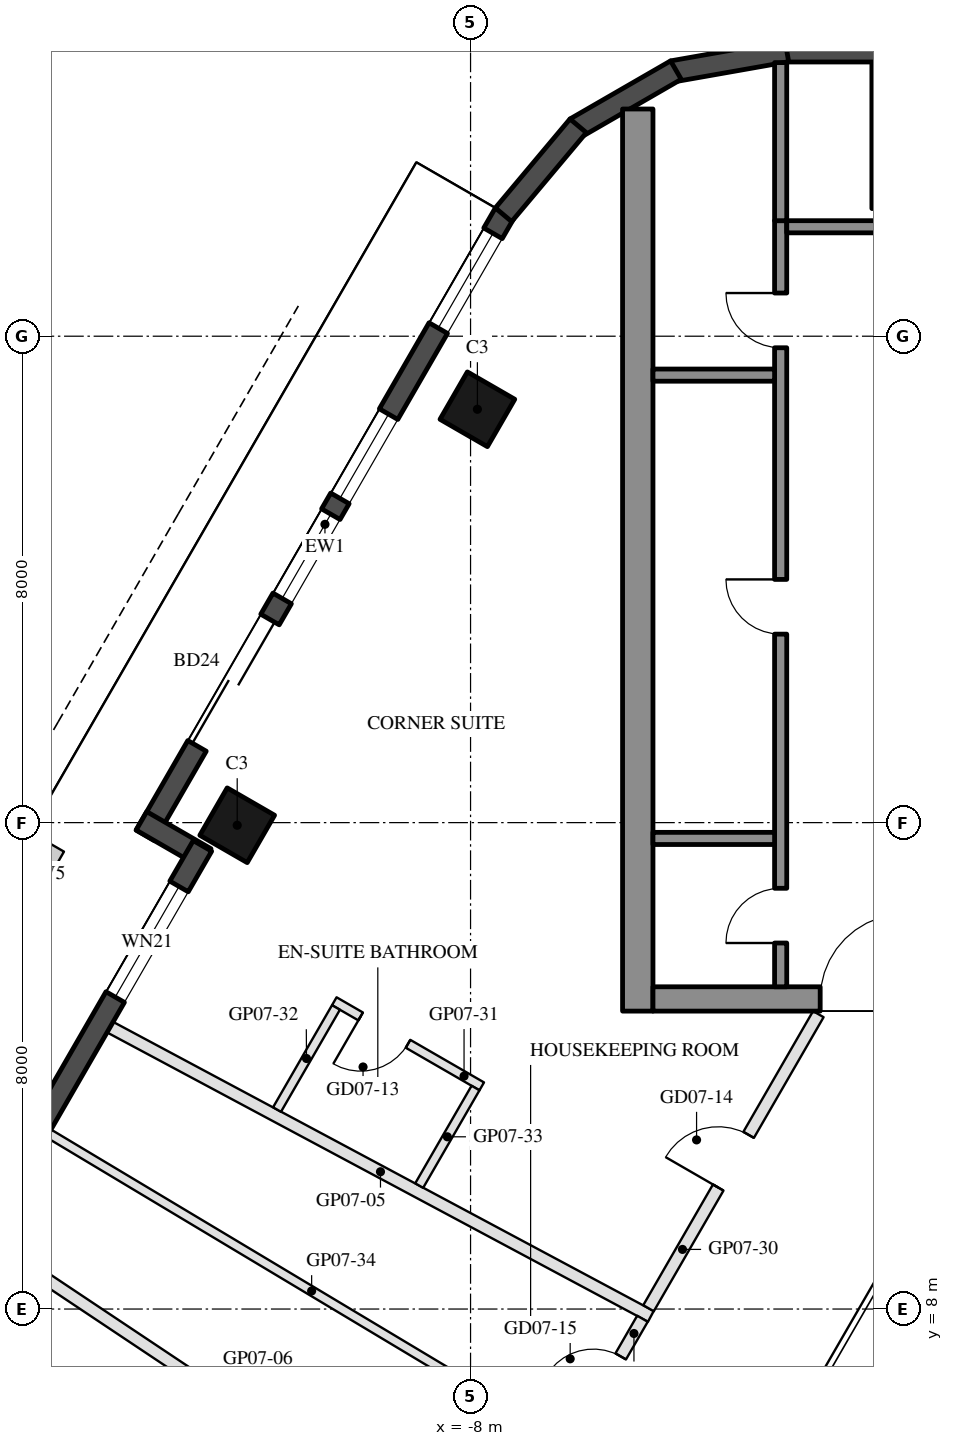
"""IFC4 building model, lengths in metres.
Left out: names, types, materials, properties, quantities, classifications, styles, units other than length and angle.
Written with IfcOpenShell. Run it as: python <this file> out.ifc"""

import sys

from ifc_helpers import new_model, si_unit, direction, frame, frame_2d, origin, origin_2d, place, context, subcontext, project, spatial, rectangle, hollow_rectangle, extrude, element, fill, save


model = new_model("IFC4")
c1 = context("Model", 3, precision=1e-05, world=origin(), true_north=direction((0.0, 1.0)))
c2 = subcontext(c1, "Body", "Model", "MODEL_VIEW")
j1 = project(units=[si_unit("LENGTHUNIT", "METRE"), si_unit("PLANEANGLEUNIT", "RADIAN")], contexts=[c1])
p1 = place(None, origin())
s1 = spatial("IfcSite", under=j1, at=p1, CompositionType="ELEMENT")
p2 = place(p1, origin())
s2 = spatial("IfcBuilding", under=s1, at=p2, CompositionType="ELEMENT")
p3 = place(p2, frame((0.0, 0.0, 98.3)))
s3 = spatial("IfcBuildingStorey", under=s2, at=p3, CompositionType="ELEMENT", Elevation=98.3)
for number, where, z_axis, x_axis in (
    (1, (-7.888, 22.798, 0.0), (0.0, 0.0, 1.0), (0.5, 0.866, 0.0)),
    (2, (-11.838, 15.957, 0.0), (0.0, 0.0, 1.0), (0.5, 0.866, 0.0)),
):
    element("IfcColumn", number, at=place(p3, frame(where, z_axis=z_axis, x_axis=x_axis)), inside=s3, PredefinedType="COLUMN", context=c2, shape_type="SweptSolid", body=[
        extrude(hollow_rectangle(XDim=0.9, YDim=0.9, WallThickness=0.04, at=origin_2d()), origin(), (0.0, 0.0, 1.0), 3.7),
    ])
p4 = place(p3, frame((0.0, 27.3, 0.0), z_axis=(0.0, 0.0, 1.0), x_axis=(1.0, 0.0, 0.0)))
e3 = element("IfcColumn", 3, at=p4, inside=s3, PredefinedType="COLUMN", context=c2, shape_type="SweptSolid", body=[
    extrude(hollow_rectangle(XDim=2.8, YDim=2.4, WallThickness=0.07, at=origin_2d()), origin(), (0.0, 0.0, 1.0), 3.7),
])
p5 = place(p3, frame((-7.441, 26.022, 0.0), z_axis=(0.0, 0.0, 1.0), x_axis=(-0.499992533062, -0.86602971478, 0.0)))
e4 = element("IfcWall", 4, at=p5, inside=s3, PredefinedType="SOLIDWALL", context=c2, shape_type="SweptSolid", body=[
    extrude(rectangle(XDim=11.816, YDim=0.35, at=frame_2d((5.908, 0.0))), origin(), (0.0, 0.0, 1.0), 3.55),
])
p6 = place(p5, frame((0.381, 0.0, 0.3)))
e5 = element("IfcOpeningElement", 5, at=p6, cuts=e4, PredefinedType="OPENING", context=c2, shape_type="SweptSolid", body=[
    extrude(rectangle(XDim=1.8, YDim=2.65, at=frame_2d((0.9, 1.325))), frame((0.0, 0.185, 0.0), z_axis=(0.0, -1.0, 0.0), x_axis=(1.0, 0.0, 0.0)), (0.0, 0.0, 1.0), 0.37),
])
p7 = place(p5, frame((7.716, 0.0, 0.0)))
e6 = element("IfcOpeningElement", 6, at=p7, cuts=e4, PredefinedType="OPENING", context=c2, shape_type="SweptSolid", body=[
    extrude(rectangle(XDim=2.4, YDim=2.4, at=frame_2d((1.2, 1.2))), frame((0.0, 0.185, 0.0), z_axis=(0.0, -1.0, 0.0), x_axis=(1.0, 0.0, 0.0)), (0.0, 0.0, 1.0), 0.37),
])
p8 = place(p5, frame((3.815, 0.0, 0.3)))
e7 = element("IfcOpeningElement", 7, at=p8, cuts=e4, PredefinedType="OPENING", context=c2, shape_type="SweptSolid", body=[
    extrude(rectangle(XDim=1.6, YDim=2.65, at=frame_2d((0.8, 1.325))), frame((0.0, 0.185, 0.0), z_axis=(0.0, -1.0, 0.0), x_axis=(1.0, 0.0, 0.0)), (0.0, 0.0, 1.0), 0.37),
])
p9 = place(p5, frame((5.715, 0.0, 0.3)))
e8 = element("IfcOpeningElement", 8, at=p9, cuts=e4, PredefinedType="OPENING", context=c2, shape_type="SweptSolid", body=[
    extrude(rectangle(XDim=1.6, YDim=2.65, at=frame_2d((0.8, 1.325))), frame((0.0, 0.185, 0.0), z_axis=(0.0, -1.0, 0.0), x_axis=(1.0, 0.0, 0.0)), (0.0, 0.0, 1.0), 0.37),
])
p10 = place(p3, frame((-13.413, 16.029, 0.0), z_axis=(0.0, 0.0, 1.0), x_axis=(0.866005645448, -0.500034220881, 0.0)))
e9 = element("IfcWall", 9, at=p10, inside=s3, PredefinedType="SOLIDWALL", context=c2, shape_type="SweptSolid", body=[
    extrude(rectangle(XDim=1.22, YDim=0.35, at=frame_2d((0.61, 0.0))), origin(), (0.0, 0.0, 1.0), 3.55),
])
p11 = place(p3, frame((-12.409, 15.617, 0.0), z_axis=(0.0, 0.0, 1.0), x_axis=(-0.500003597184, -0.866023326939, 0.0)))
e10 = element("IfcWall", 10, at=p11, inside=s3, PredefinedType="SOLIDWALL", context=c2, shape_type="SweptSolid", body=[
    extrude(rectangle(XDim=6.74, YDim=0.35, at=frame_2d((3.37, 0.0))), origin(), (0.0, 0.0, 1.0), 3.55),
])
p12 = place(p11, frame((0.77, 0.0, 0.3)))
e11 = element("IfcOpeningElement", 11, at=p12, cuts=e10, PredefinedType="OPENING", context=c2, shape_type="SweptSolid", body=[
    extrude(rectangle(XDim=2.1, YDim=2.65, at=frame_2d((1.05, 1.325))), frame((0.0, 0.185, 0.0), z_axis=(0.0, -1.0, 0.0), x_axis=(1.0, 0.0, 0.0)), (0.0, 0.0, 1.0), 0.37),
])
p13 = place(p3, frame((2.829, 28.685, 0.0), z_axis=(0.0, 0.0, 1.0), x_axis=(-1.0, 0.0, 0.0)))
e12 = element("IfcWall", 12, at=p13, inside=s3, PredefinedType="SOLIDWALL", context=c2, shape_type="SweptSolid", body=[
    extrude(rectangle(XDim=5.658, YDim=0.35, at=frame_2d((2.829, 0.0))), origin(), (0.0, 0.0, 1.0), 3.55),
])
for number, where, z_axis, x_axis in (
    (13, (-2.799, 28.688, 0.0), (0.0, 0.0, 1.0), (-0.985, -0.174, 0.0)),
    (14, (-4.623, 28.377, 0.0), (0.0, 0.0, 1.0), (-0.866, -0.5, 0.0)),
):
    element("IfcWall", number, at=place(p3, frame(where, z_axis=z_axis, x_axis=x_axis)), inside=s3, PredefinedType="SOLIDWALL", context=c2, shape_type="SweptSolid", body=[
        extrude(rectangle(XDim=1.91, YDim=0.35, at=frame_2d((0.955, 0.0))), origin(), (0.0, 0.0, 1.0), 3.55),
    ])
p14 = place(p3, frame((-6.23, 27.461, 0.0), z_axis=(0.0, 0.0, 1.0), x_axis=(-0.642808304945, -0.766027077259, 0.0)))
e15 = element("IfcWall", 15, at=p14, inside=s3, PredefinedType="SOLIDWALL", context=c2, shape_type="SweptSolid", body=[
    extrude(rectangle(XDim=1.91, YDim=0.35, at=frame_2d((0.955, 0.0))), origin(), (0.0, 0.0, 1.0), 3.55),
])
p15 = place(p3, frame((-5.25, 12.9, 0.0), z_axis=(0.0, 0.0, 1.0), x_axis=(0.0, 1.0, 0.0)))
e16 = element("IfcWall", 16, at=p15, inside=s3, PredefinedType="SHEAR", context=c2, shape_type="SweptSolid", body=[
    extrude(rectangle(XDim=14.837, YDim=0.5, at=frame_2d((7.418, 0.0))), origin(), (0.0, 0.0, 1.0), 3.5),
])
p16 = place(p3, frame((5.0, 13.1, 0.0), z_axis=(0.0, 0.0, 1.0), x_axis=(-1.0, 0.0, 0.0)))
e17 = element("IfcWall", 17, at=p16, inside=s3, PredefinedType="SHEAR", context=c2, shape_type="SweptSolid", body=[
    extrude(rectangle(XDim=10.0, YDim=0.4, at=frame_2d((5.0, 0.0))), origin(), (0.0, 0.0, 1.0), 3.5),
])
p17 = place(p16, frame((3.55, 0.0, 0.0)))
e18 = element("IfcOpeningElement", 18, at=p17, cuts=e17, PredefinedType="OPENING", context=c2, shape_type="SweptSolid", body=[
    extrude(rectangle(XDim=1.1, YDim=2.1, at=frame_2d((0.55, 1.05))), frame((0.0, 0.21, 0.0), z_axis=(0.0, -1.0, 0.0), x_axis=(1.0, 0.0, 0.0)), (0.0, 0.0, 1.0), 0.42),
])
p18 = place(p16, frame((5.85, 0.0, 0.0)))
e19 = element("IfcOpeningElement", 19, at=p18, cuts=e17, PredefinedType="OPENING", context=c2, shape_type="SweptSolid", body=[
    extrude(rectangle(XDim=1.4, YDim=2.1, at=frame_2d((0.7, 1.05))), frame((0.0, 0.21, 0.0), z_axis=(0.0, -1.0, 0.0), x_axis=(1.0, 0.0, 0.0)), (0.0, 0.0, 1.0), 0.42),
])
p19 = place(p3, frame((-2.9, 13.3, 0.0), z_axis=(0.0, 0.0, 1.0), x_axis=(0.0, 1.0, 0.0)))
e20 = element("IfcWall", 20, at=p19, inside=s3, PredefinedType="SHEAR", context=c2, shape_type="SweptSolid", body=[
    extrude(rectangle(XDim=12.6, YDim=0.2, at=frame_2d((6.3, 0.0))), origin(), (0.0, 0.0, 1.0), 3.5),
])
p20 = place(p19, frame((0.72, 0.0, 0.0)))
e21 = element("IfcOpeningElement", 21, at=p20, cuts=e20, PredefinedType="OPENING", context=c2, shape_type="SweptSolid", body=[
    extrude(rectangle(XDim=0.9, YDim=2.1, at=frame_2d((0.45, 1.05))), frame((0.0, 0.11, 0.0), z_axis=(0.0, -1.0, 0.0), x_axis=(1.0, 0.0, 0.0)), (0.0, 0.0, 1.0), 0.22),
])
p21 = place(p19, frame((5.8, 0.0, 0.0)))
e22 = element("IfcOpeningElement", 22, at=p21, cuts=e20, PredefinedType="OPENING", context=c2, shape_type="SweptSolid", body=[
    extrude(rectangle(XDim=0.9, YDim=2.1, at=frame_2d((0.45, 1.05))), frame((0.0, 0.11, 0.0), z_axis=(0.0, -1.0, 0.0), x_axis=(1.0, 0.0, 0.0)), (0.0, 0.0, 1.0), 0.22),
])
p22 = place(p19, frame((10.51, 0.0, 0.0)))
e23 = element("IfcOpeningElement", 23, at=p22, cuts=e20, PredefinedType="OPENING", context=c2, shape_type="SweptSolid", body=[
    extrude(rectangle(XDim=0.9, YDim=2.1, at=frame_2d((0.45, 1.05))), frame((0.0, 0.11, 0.0), z_axis=(0.0, -1.0, 0.0), x_axis=(1.0, 0.0, 0.0)), (0.0, 0.0, 1.0), 0.22),
])
p23 = place(p3, frame((-0.4, 25.8, 0.0), z_axis=(0.0, 0.0, 1.0), x_axis=(-1.0, 0.0, 0.0)))
e24 = element("IfcWall", 24, at=p23, inside=s3, PredefinedType="SHEAR", context=c2, shape_type="SweptSolid", body=[
    extrude(rectangle(XDim=2.4, YDim=0.2, at=frame_2d((1.2, 0.0))), origin(), (0.0, 0.0, 1.0), 3.5),
])
for number, where, z_axis, x_axis in (
    (25, (-3.0, 15.74, 0.0), (0.0, 0.0, 1.0), (-1.0, 0.0, 0.0)),
    (26, (-3.0, 23.36, 0.0), (0.0, 0.0, 1.0), (-1.0, 0.0, 0.0)),
):
    element("IfcWall", number, at=place(p3, frame(where, z_axis=z_axis, x_axis=x_axis)), inside=s3, PredefinedType="SHEAR", context=c2, shape_type="SweptSolid", body=[
        extrude(rectangle(XDim=2.0, YDim=0.2, at=frame_2d((1.0, 0.0))), origin(), (0.0, 0.0, 1.0), 3.5),
    ])
p24 = place(p3, frame((-2.9, 25.9, 0.0), z_axis=(0.0, 0.0, 1.0), x_axis=(0.0, 1.0, 0.0)))
e27 = element("IfcWall", 27, at=p24, inside=s3, PredefinedType="SHEAR", context=c2, shape_type="SweptSolid", body=[
    extrude(rectangle(XDim=2.6, YDim=0.2, at=frame_2d((1.3, 0.0))), origin(), (0.0, 0.0, 1.0), 3.5),
])
p25 = place(p3, frame((-13.928, 12.636, 0.0), z_axis=(0.0, 0.0, 1.0), x_axis=(0.881791431821, -0.471639555981, 0.0)))
e28 = element("IfcWall", 28, at=p25, inside=s3, PredefinedType="PARTITIONING", context=c2, shape_type="SweptSolid", body=[
    extrude(rectangle(XDim=10.085, YDim=0.2, at=frame_2d((5.042, 0.0))), origin(), (0.0, 0.0, 1.0), 2.95),
])
p26 = place(p3, frame((-15.447, 8.806, 0.0), z_axis=(0.0, 0.0, 1.0), x_axis=(0.831801127359, -0.55507376494, 0.0)))
e29 = element("IfcWall", 29, at=p26, inside=s3, PredefinedType="PARTITIONING", context=c2, shape_type="SweptSolid", body=[
    extrude(rectangle(XDim=9.5, YDim=0.2, at=frame_2d((4.75, 0.0))), origin(), (0.0, 0.0, 1.0), 2.95),
])
p27 = place(p3, frame((-5.073, 8.013, 0.0), z_axis=(0.0, 0.0, 1.0), x_axis=(0.500003731568, 0.866023249352, 0.0)))
e30 = element("IfcWall", 30, at=p27, inside=s3, PredefinedType="PARTITIONING", context=c2, shape_type="SweptSolid", body=[
    extrude(rectangle(XDim=5.585, YDim=0.2, at=frame_2d((2.792, 0.0))), origin(), (0.0, 0.0, 1.0), 2.95),
])
p28 = place(p27, frame((2.292, 0.0, 0.0)))
e31 = element("IfcOpeningElement", 31, at=p28, cuts=e30, PredefinedType="OPENING", context=c2, shape_type="SweptSolid", body=[
    extrude(rectangle(XDim=1.0, YDim=2.1, at=frame_2d((0.5, 1.05))), frame((0.0, 0.11, 0.0), z_axis=(0.0, -1.0, 0.0), x_axis=(1.0, 0.0, 0.0)), (0.0, 0.0, 1.0), 0.22),
])
p29 = place(p3, frame((-7.816, 11.662, 0.0), z_axis=(0.0, 0.0, 1.0), x_axis=(-0.865996816683, 0.500049511043, 0.0)))
e32 = element("IfcWall", 32, at=p29, inside=s3, PredefinedType="PARTITIONING", context=c2, shape_type="SweptSolid", body=[
    extrude(rectangle(XDim=2.8, YDim=0.15, at=frame_2d((1.4, 0.0))), origin(), (0.0, 0.0, 1.0), 3.55),
])
p30 = place(p29, frame((1.4, 0.0, 0.0)))
e33 = element("IfcOpeningElement", 33, at=p30, cuts=e32, PredefinedType="OPENING", context=c2, shape_type="SweptSolid", body=[
    extrude(rectangle(XDim=0.9, YDim=2.1, at=frame_2d((0.45, 1.05))), frame((0.0, 0.085, 0.0), z_axis=(0.0, -1.0, 0.0), x_axis=(1.0, 0.0, 0.0)), (0.0, 0.0, 1.0), 0.17),
])
p31 = place(p3, frame((-10.213, 12.96, 0.0), z_axis=(0.0, 0.0, 1.0), x_axis=(-0.500013181875, -0.866017793092, 0.0)))
e34 = element("IfcWall", 34, at=p31, inside=s3, PredefinedType="PARTITIONING", context=c2, shape_type="SweptSolid", body=[
    extrude(rectangle(XDim=1.938, YDim=0.15, at=frame_2d((0.969, 0.0))), origin(), (0.0, 0.0, 1.0), 3.55),
])
p32 = place(p3, frame((-7.918, 11.635, 0.0), z_axis=(0.0, 0.0, 1.0), x_axis=(-0.499924019097, -0.866069266935, 0.0)))
e35 = element("IfcWall", 35, at=p32, inside=s3, PredefinedType="PARTITIONING", context=c2, shape_type="SweptSolid", body=[
    extrude(rectangle(XDim=1.852, YDim=0.15, at=frame_2d((0.926, 0.0))), origin(), (0.0, 0.0, 1.0), 3.55),
])
p33 = place(p3, frame((-14.937, 10.888, 0.0), z_axis=(0.0, 0.0, 1.0), x_axis=(0.857798338883, -0.513986390685, 0.0)))
e36 = element("IfcWall", 36, at=p33, inside=s3, PredefinedType="PARTITIONING", context=c2, shape_type="SweptSolid", body=[
    extrude(rectangle(XDim=10.081, YDim=0.15, at=frame_2d((5.041, 0.0))), origin(), (0.0, 0.0, 1.0), 2.96),
])
p34 = place(p3, frame((-6.338, 5.823, 0.0), z_axis=(0.0, 0.0, 1.0), x_axis=(0.499982502246, 0.866035505882, 0.0)))
e37 = element("IfcWall", 37, at=p34, inside=s3, PredefinedType="PARTITIONING", context=c2, shape_type="SweptSolid", body=[
    extrude(rectangle(XDim=2.33, YDim=0.2, at=frame_2d((1.165, 0.0))), origin(), (0.0, 0.0, 1.0), 2.95),
])
p35 = place(p34, frame((0.715, 0.0, 0.0)))
e38 = element("IfcOpeningElement", 38, at=p35, cuts=e37, PredefinedType="OPENING", context=c2, shape_type="SweptSolid", body=[
    extrude(rectangle(XDim=0.9, YDim=2.1, at=frame_2d((0.45, 1.05))), frame((0.0, 0.11, 0.0), z_axis=(0.0, -1.0, 0.0), x_axis=(1.0, 0.0, 0.0)), (0.0, 0.0, 1.0), 0.22),
])
p36 = place(p6, origin())
e39 = element("IfcWindow", 39, at=p36, inside=s3, PartitioningType="SINGLE_PANEL", PredefinedType="WINDOW", context=c2, shape_type="SweptSolid", body=[
    extrude(rectangle(XDim=1.8, YDim=2.65, at=frame_2d((0.9, 1.325))), frame((0.0, 0.03, 0.0), z_axis=(0.0, -1.0, 0.0), x_axis=(1.0, 0.0, 0.0)), (0.0, 0.0, 1.0), 0.06),
])
fill(e5, e39)
p37 = place(p7, frame((2.4, 0.0, 0.0), z_axis=(0.0, 0.0, 1.0), x_axis=(-1.0, 0.0, 0.0)))
e40 = element("IfcDoor", 40, at=p37, inside=s3, OperationType="SLIDING_TO_LEFT", PredefinedType="DOOR", context=c2, shape_type="SweptSolid", body=[
    extrude(rectangle(XDim=2.4, YDim=2.4, at=frame_2d((1.2, 1.2))), frame((0.0, 0.025, 0.0), z_axis=(0.0, -1.0, 0.0), x_axis=(1.0, 0.0, 0.0)), (0.0, 0.0, 1.0), 0.05),
])
fill(e6, e40)
p38 = place(p8, origin())
e41 = element("IfcWindow", 41, at=p38, inside=s3, PartitioningType="SINGLE_PANEL", PredefinedType="WINDOW", context=c2, shape_type="SweptSolid", body=[
    extrude(rectangle(XDim=1.6, YDim=2.65, at=frame_2d((0.8, 1.325))), frame((0.0, 0.03, 0.0), z_axis=(0.0, -1.0, 0.0), x_axis=(1.0, 0.0, 0.0)), (0.0, 0.0, 1.0), 0.06),
])
fill(e7, e41)
p39 = place(p9, origin())
e42 = element("IfcWindow", 42, at=p39, inside=s3, PartitioningType="SINGLE_PANEL", PredefinedType="WINDOW", context=c2, shape_type="SweptSolid", body=[
    extrude(rectangle(XDim=1.6, YDim=2.65, at=frame_2d((0.8, 1.325))), frame((0.0, 0.03, 0.0), z_axis=(0.0, -1.0, 0.0), x_axis=(1.0, 0.0, 0.0)), (0.0, 0.0, 1.0), 0.06),
])
fill(e8, e42)
p40 = place(p12, origin())
e43 = element("IfcWindow", 43, at=p40, inside=s3, PartitioningType="SINGLE_PANEL", PredefinedType="WINDOW", context=c2, shape_type="SweptSolid", body=[
    extrude(rectangle(XDim=2.1, YDim=2.65, at=frame_2d((1.05, 1.325))), frame((0.0, 0.03, 0.0), z_axis=(0.0, -1.0, 0.0), x_axis=(1.0, 0.0, 0.0)), (0.0, 0.0, 1.0), 0.06),
])
fill(e11, e43)
p41 = place(p20, origin())
e44 = element("IfcDoor", 44, at=p41, inside=s3, OperationType="SINGLE_SWING_LEFT", PredefinedType="DOOR", context=c2, shape_type="SweptSolid", body=[
    extrude(rectangle(XDim=0.9, YDim=2.1, at=frame_2d((0.45, 1.05))), frame((0.0, 0.025, 0.0), z_axis=(0.0, -1.0, 0.0), x_axis=(1.0, 0.0, 0.0)), (0.0, 0.0, 1.0), 0.05),
])
fill(e21, e44)
p42 = place(p21, origin())
e45 = element("IfcDoor", 45, at=p42, inside=s3, OperationType="SINGLE_SWING_RIGHT", PredefinedType="DOOR", context=c2, shape_type="SweptSolid", body=[
    extrude(rectangle(XDim=0.9, YDim=2.1, at=frame_2d((0.45, 1.05))), frame((0.0, 0.025, 0.0), z_axis=(0.0, -1.0, 0.0), x_axis=(1.0, 0.0, 0.0)), (0.0, 0.0, 1.0), 0.05),
])
fill(e22, e45)
p43 = place(p22, origin())
e46 = element("IfcDoor", 46, at=p43, inside=s3, OperationType="SINGLE_SWING_RIGHT", PredefinedType="DOOR", context=c2, shape_type="SweptSolid", body=[
    extrude(rectangle(XDim=0.9, YDim=2.1, at=frame_2d((0.45, 1.05))), frame((0.0, 0.025, 0.0), z_axis=(0.0, -1.0, 0.0), x_axis=(1.0, 0.0, 0.0)), (0.0, 0.0, 1.0), 0.05),
])
fill(e23, e46)
p44 = place(p18, frame((1.4, 0.0, 0.0), z_axis=(0.0, 0.0, 1.0), x_axis=(-1.0, 0.0, 0.0)))
e47 = element("IfcDoor", 47, at=p44, inside=s3, OperationType="DOUBLE_DOOR_SINGLE_SWING", PredefinedType="DOOR", context=c2, shape_type="SweptSolid", body=[
    extrude(rectangle(XDim=1.4, YDim=2.1, at=frame_2d((0.7, 1.05))), frame((0.0, 0.025, 0.0), z_axis=(0.0, -1.0, 0.0), x_axis=(1.0, 0.0, 0.0)), (0.0, 0.0, 1.0), 0.05),
])
fill(e19, e47)
p45 = place(p30, origin())
e48 = element("IfcDoor", 48, at=p45, inside=s3, OperationType="SINGLE_SWING_RIGHT", PredefinedType="DOOR", context=c2, shape_type="SweptSolid", body=[
    extrude(rectangle(XDim=0.9, YDim=2.1, at=frame_2d((0.45, 1.05))), frame((0.0, 0.025, 0.0), z_axis=(0.0, -1.0, 0.0), x_axis=(1.0, 0.0, 0.0)), (0.0, 0.0, 1.0), 0.05),
])
fill(e33, e48)
p46 = place(p28, origin())
e49 = element("IfcDoor", 49, at=p46, inside=s3, OperationType="SINGLE_SWING_LEFT", PredefinedType="DOOR", context=c2, shape_type="SweptSolid", body=[
    extrude(rectangle(XDim=1.0, YDim=2.1, at=frame_2d((0.5, 1.05))), frame((0.0, 0.025, 0.0), z_axis=(0.0, -1.0, 0.0), x_axis=(1.0, 0.0, 0.0)), (0.0, 0.0, 1.0), 0.05),
])
fill(e31, e49)
p47 = place(p35, origin())
e50 = element("IfcDoor", 50, at=p47, inside=s3, OperationType="SINGLE_SWING_LEFT", PredefinedType="DOOR", context=c2, shape_type="SweptSolid", body=[
    extrude(rectangle(XDim=0.9, YDim=2.1, at=frame_2d((0.45, 1.05))), frame((0.0, 0.025, 0.0), z_axis=(0.0, -1.0, 0.0), x_axis=(1.0, 0.0, 0.0)), (0.0, 0.0, 1.0), 0.05),
])
fill(e38, e50)
save(model, sys.argv[1])
